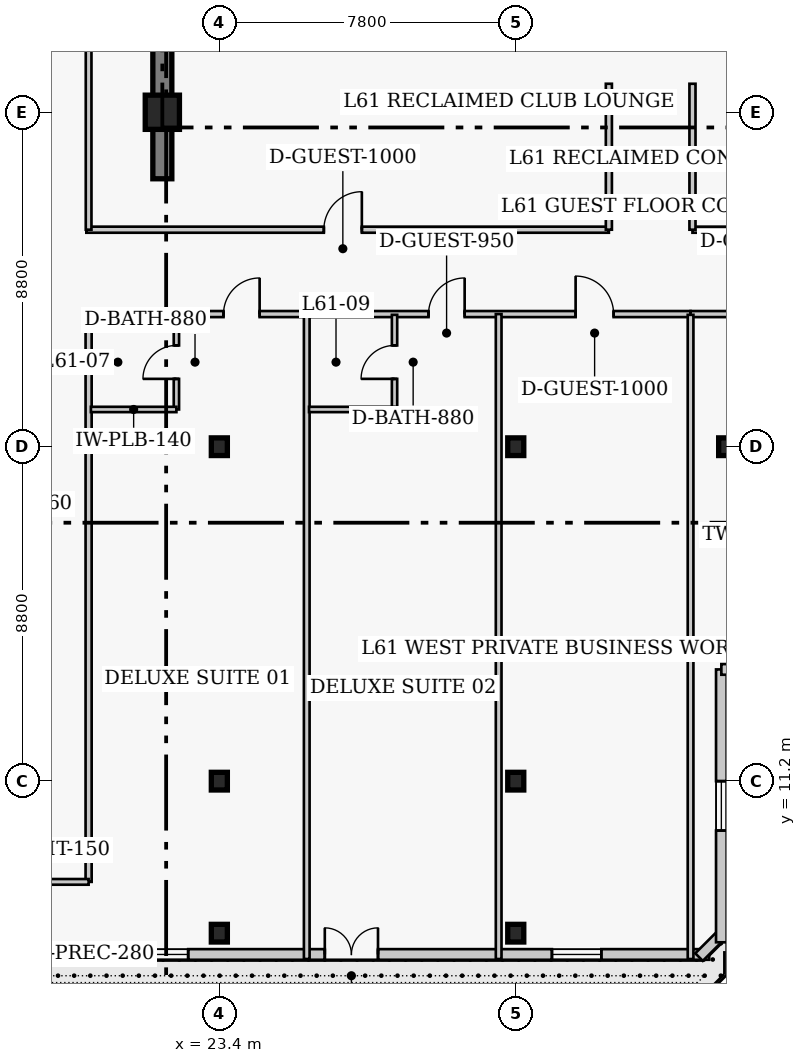
"""IFC4 building model, lengths in metres.
Left out: names, types, materials, properties, quantities, classifications, styles, units other than length and angle.
Written with IfcOpenShell. Run it as: python <this file> out.ifc"""

import sys

from ifc_helpers import new_model, si_unit, direction, frame, frame_2d, origin, origin_2d, place, context, subcontext, project, spatial, rectangle, i_section, extrude, element, fill, save


model = new_model("IFC4")
c1 = context("Model", 3, precision=1e-05, world=origin(), true_north=direction((0.0, 1.0)))
c2 = subcontext(c1, "Body", "Model", "MODEL_VIEW")
j1 = project(units=[si_unit("LENGTHUNIT", "METRE"), si_unit("PLANEANGLEUNIT", "RADIAN")], contexts=[c1])
p1 = place(None, origin())
s1 = spatial("IfcSite", under=j1, at=p1, CompositionType="ELEMENT")
p2 = place(p1, origin())
s2 = spatial("IfcBuilding", under=s1, at=p2, CompositionType="ELEMENT")
p3 = place(p2, frame((0.0, 0.0, 245.4)))
s3 = spatial("IfcBuildingStorey", under=s2, at=p3, CompositionType="ELEMENT", Elevation=245.4)
p4 = place(p3, frame((21.9, 27.05, 0.0), z_axis=(0.0, 0.0, 1.0), x_axis=(0.0, 1.0, 0.0)))
e1 = element("IfcWall", 1, at=p4, inside=s3, PredefinedType="SHEAR", context=c2, shape_type="SweptSolid", body=[
    extrude(rectangle(XDim=13.52, YDim=0.5, at=frame_2d((6.76, 0.0))), origin(), (0.0, 0.0, 1.0), 4.0),
])
for number, where, z_axis, x_axis in (
    (2, (23.4, 11.2, 0.0), (0.0, 0.0, 1.0), (1.0, 0.0, 0.0)),
    (3, (23.4, 20.0, 0.0), (0.0, 0.0, 1.0), (1.0, 0.0, 0.0)),
    (4, (31.2, 11.2, 0.0), (0.0, 0.0, 1.0), (1.0, 0.0, 0.0)),
    (5, (31.2, 20.0, 0.0), (0.0, 0.0, 1.0), (1.0, 0.0, 0.0)),
    (6, (36.75, 20.0, 0.0), (0.0, 0.0, 1.0), (1.0, 0.0, 0.0)),
):
    element("IfcColumn", number, at=place(p3, frame(where, z_axis=z_axis, x_axis=x_axis)), inside=s3, PredefinedType="COLUMN", context=c2, shape_type="SweptSolid", body=[
        extrude(i_section(OverallWidth=0.422, OverallDepth=0.465, WebThickness=0.045, FlangeThickness=0.073, FilletRadius=0.017, at=origin_2d()), origin(), (0.0, 0.0, 1.0), 4.0),
    ])
p5 = place(p3, frame((21.9, 28.8, 0.0), z_axis=(0.0, 0.0, 1.0), x_axis=(1.0, 0.0, 0.0)))
e7 = element("IfcColumn", 7, at=p5, inside=s3, PredefinedType="COLUMN", context=c2, shape_type="SweptSolid", body=[
    extrude(rectangle(XDim=0.9, YDim=0.9, at=origin_2d()), origin(), (0.0, 0.0, 1.0), 4.0),
])
for number, where, z_axis, x_axis in (
    (8, (23.4, 7.2, 0.0), (0.0, 0.0, 1.0), (1.0, 0.0, 0.0)),
    (9, (31.2, 7.2, 0.0), (0.0, 0.0, 1.0), (1.0, 0.0, 0.0)),
):
    element("IfcColumn", number, at=place(p3, frame(where, z_axis=z_axis, x_axis=x_axis)), inside=s3, PredefinedType="COLUMN", context=c2, shape_type="SweptSolid", body=[
        extrude(i_section(OverallWidth=0.422, OverallDepth=0.465, WebThickness=0.045, FlangeThickness=0.073, FilletRadius=0.017, at=origin_2d()), origin(), (0.0, 0.0, 1.0), 4.0),
    ])
p6 = place(p3, frame((11.46, 6.64, 0.0), z_axis=(0.0, 0.0, 1.0), x_axis=(1.0, 0.0, 0.0)))
e10 = element("IfcWall", 10, at=p6, inside=s3, PredefinedType="SOLIDWALL", context=c2, shape_type="SweptSolid", body=[
    extrude(rectangle(XDim=24.83, YDim=0.28, at=frame_2d((12.415, 0.0))), origin(), (0.0, 0.0, 1.0), 3.76),
])
p7 = place(p6, frame((14.715, 0.0, 0.0)))
e11 = element("IfcOpeningElement", 11, at=p7, cuts=e10, PredefinedType="OPENING", context=c2, shape_type="SweptSolid", body=[
    extrude(rectangle(XDim=1.4, YDim=2.15, at=frame_2d((0.7, 1.075))), frame((0.0, 0.15, 0.0), z_axis=(0.0, -1.0, 0.0), x_axis=(1.0, 0.0, 0.0)), (0.0, 0.0, 1.0), 0.3),
])
p8 = place(p6, frame((3.488, 0.0, 0.85)))
e12 = element("IfcOpeningElement", 12, at=p8, cuts=e10, PredefinedType="OPENING", context=c2, shape_type="SweptSolid", body=[
    extrude(rectangle(XDim=1.3, YDim=1.7, at=frame_2d((0.65, 0.85))), frame((0.0, 0.15, 0.0), z_axis=(0.0, -1.0, 0.0), x_axis=(1.0, 0.0, 0.0)), (0.0, 0.0, 1.0), 0.3),
])
p9 = place(p6, frame((20.692, 0.0, 0.85)))
e13 = element("IfcOpeningElement", 13, at=p9, cuts=e10, PredefinedType="OPENING", context=c2, shape_type="SweptSolid", body=[
    extrude(rectangle(XDim=1.3, YDim=1.7, at=frame_2d((0.65, 0.85))), frame((0.0, 0.15, 0.0), z_axis=(0.0, -1.0, 0.0), x_axis=(1.0, 0.0, 0.0)), (0.0, 0.0, 1.0), 0.3),
])
p10 = place(p6, frame((9.82, 0.0, 0.85)))
e14 = element("IfcOpeningElement", 14, at=p10, cuts=e10, PredefinedType="OPENING", context=c2, shape_type="SweptSolid", body=[
    extrude(rectangle(XDim=1.3, YDim=1.7, at=frame_2d((0.65, 0.85))), frame((0.0, 0.15, 0.0), z_axis=(0.0, -1.0, 0.0), x_axis=(1.0, 0.0, 0.0)), (0.0, 0.0, 1.0), 0.3),
])
p11 = place(p3, frame((36.023, 6.571, 0.0), z_axis=(0.0, 0.0, 1.0), x_axis=(0.707106781187, 0.707106781187, 0.0)))
e15 = element("IfcWall", 15, at=p11, inside=s3, PredefinedType="SOLIDWALL", context=c2, shape_type="SweptSolid", body=[
    extrude(rectangle(XDim=0.928, YDim=0.28, at=frame_2d((0.464, 0.0))), origin(), (0.0, 0.0, 1.0), 3.76),
])
p12 = place(p3, frame((36.61, 6.96, 0.0), z_axis=(0.0, 0.0, 1.0), x_axis=(0.0, 1.0, 0.0)))
e16 = element("IfcWall", 16, at=p12, inside=s3, PredefinedType="SOLIDWALL", context=c2, shape_type="SweptSolid", body=[
    extrude(rectangle(XDim=7.18, YDim=0.28, at=frame_2d((3.59, 0.0))), origin(), (0.0, 0.0, 1.0), 3.76),
])
p13 = place(p12, frame((2.94, 0.0, 0.85)))
e17 = element("IfcOpeningElement", 17, at=p13, cuts=e16, PredefinedType="OPENING", context=c2, shape_type="SweptSolid", body=[
    extrude(rectangle(XDim=1.3, YDim=1.7, at=frame_2d((0.65, 0.85))), frame((0.0, 0.15, 0.0), z_axis=(0.0, -1.0, 0.0), x_axis=(1.0, 0.0, 0.0)), (0.0, 0.0, 1.0), 0.3),
])
p14 = place(p3, frame((36.61, 14.14, 0.0), z_axis=(0.0, 0.0, 1.0), x_axis=(1.0, 0.0, 0.0)))
e18 = element("IfcWall", 18, at=p14, inside=s3, PredefinedType="SOLIDWALL", context=c2, shape_type="SweptSolid", body=[
    extrude(rectangle(XDim=4.78, YDim=0.28, at=frame_2d((2.39, 0.0))), origin(), (0.0, 0.0, 1.0), 3.76),
])
p15 = place(p14, frame((1.74, 0.0, 0.85)))
e19 = element("IfcOpeningElement", 19, at=p15, cuts=e18, PredefinedType="OPENING", context=c2, shape_type="SweptSolid", body=[
    extrude(rectangle(XDim=1.3, YDim=1.7, at=frame_2d((0.65, 0.85))), frame((0.0, 0.15, 0.0), z_axis=(0.0, -1.0, 0.0), x_axis=(1.0, 0.0, 0.0)), (0.0, 0.0, 1.0), 0.3),
])
p16 = place(p3, frame((19.9, 25.71, 0.0), z_axis=(0.0, 0.0, 1.0), x_axis=(1.0, 0.0, 0.0)))
e20 = element("IfcWall", 20, at=p16, inside=s3, PredefinedType="PARTITIONING", context=c2, shape_type="SweptSolid", body=[
    extrude(rectangle(XDim=13.75, YDim=0.16, at=frame_2d((6.875, 0.0))), origin(), (0.0, 0.0, 1.0), 3.76),
])
p17 = place(p16, frame((6.25, 0.0, 0.0)))
e21 = element("IfcOpeningElement", 21, at=p17, cuts=e20, PredefinedType="OPENING", context=c2, shape_type="SweptSolid", body=[
    extrude(rectangle(XDim=1.0, YDim=2.15, at=frame_2d((0.5, 1.075))), frame((0.0, 0.09, 0.0), z_axis=(0.0, -1.0, 0.0), x_axis=(1.0, 0.0, 0.0)), (0.0, 0.0, 1.0), 0.18),
])
p18 = place(p3, frame((35.85, 25.71, 0.0), z_axis=(0.0, 0.0, 1.0), x_axis=(1.0, 0.0, 0.0)))
e22 = element("IfcWall", 22, at=p18, inside=s3, PredefinedType="PARTITIONING", context=c2, shape_type="SweptSolid", body=[
    extrude(rectangle(XDim=23.45, YDim=0.16, at=frame_2d((11.725, 0.0))), origin(), (0.0, 0.0, 1.0), 3.76),
])
p19 = place(p18, frame((6.15, 0.0, 0.0)))
e23 = element("IfcOpeningElement", 23, at=p19, cuts=e22, PredefinedType="OPENING", context=c2, shape_type="SweptSolid", body=[
    extrude(rectangle(XDim=1.0, YDim=2.15, at=frame_2d((0.5, 1.075))), frame((0.0, 0.09, 0.0), z_axis=(0.0, -1.0, 0.0), x_axis=(1.0, 0.0, 0.0)), (0.0, 0.0, 1.0), 0.18),
])
p20 = place(p18, frame((13.65, 0.0, 0.0)))
e24 = element("IfcOpeningElement", 24, at=p20, cuts=e22, PredefinedType="OPENING", context=c2, shape_type="SweptSolid", body=[
    extrude(rectangle(XDim=1.0, YDim=2.15, at=frame_2d((0.5, 1.075))), frame((0.0, 0.09, 0.0), z_axis=(0.0, -1.0, 0.0), x_axis=(1.0, 0.0, 0.0)), (0.0, 0.0, 1.0), 0.18),
])
for number, where, z_axis, x_axis in (
    (25, (33.65, 25.71, 0.0), (0.0, 0.0, 1.0), (0.0, 1.0, 0.0)),
    (26, (35.85, 25.71, 0.0), (0.0, 0.0, 1.0), (0.0, 1.0, 0.0)),
):
    element("IfcWall", number, at=place(p3, frame(where, z_axis=z_axis, x_axis=x_axis)), inside=s3, PredefinedType="PARTITIONING", context=c2, shape_type="SweptSolid", body=[
        extrude(rectangle(XDim=3.84, YDim=0.16, at=frame_2d((1.92, 0.0))), origin(), (0.0, 0.0, 1.0), 3.76),
    ])
p21 = place(p3, frame((19.9, 23.49, 0.0), z_axis=(0.0, 0.0, 1.0), x_axis=(1.0, 0.0, 0.0)))
e27 = element("IfcWall", 27, at=p21, inside=s3, PredefinedType="PARTITIONING", context=c2, shape_type="SweptSolid", body=[
    extrude(rectangle(XDim=15.9, YDim=0.16, at=frame_2d((7.95, 0.0))), origin(), (0.0, 0.0, 1.0), 3.76),
])
p22 = place(p21, frame((3.61, 0.0, 0.0)))
e28 = element("IfcOpeningElement", 28, at=p22, cuts=e27, PredefinedType="OPENING", context=c2, shape_type="SweptSolid", body=[
    extrude(rectangle(XDim=0.95, YDim=2.1, at=frame_2d((0.475, 1.05))), frame((0.0, 0.09, 0.0), z_axis=(0.0, -1.0, 0.0), x_axis=(1.0, 0.0, 0.0)), (0.0, 0.0, 1.0), 0.18),
])
p23 = place(p21, frame((9.005, 0.0, 0.0)))
e29 = element("IfcOpeningElement", 29, at=p23, cuts=e27, PredefinedType="OPENING", context=c2, shape_type="SweptSolid", body=[
    extrude(rectangle(XDim=0.95, YDim=2.1, at=frame_2d((0.475, 1.05))), frame((0.0, 0.09, 0.0), z_axis=(0.0, -1.0, 0.0), x_axis=(1.0, 0.0, 0.0)), (0.0, 0.0, 1.0), 0.18),
])
p24 = place(p21, frame((12.875, 0.0, 0.0)))
e30 = element("IfcOpeningElement", 30, at=p24, cuts=e27, PredefinedType="OPENING", context=c2, shape_type="SweptSolid", body=[
    extrude(rectangle(XDim=1.0, YDim=2.15, at=frame_2d((0.5, 1.075))), frame((0.0, 0.09, 0.0), z_axis=(0.0, -1.0, 0.0), x_axis=(1.0, 0.0, 0.0)), (0.0, 0.0, 1.0), 0.18),
])
p25 = place(p3, frame((35.8, 23.49, 0.0), z_axis=(0.0, 0.0, 1.0), x_axis=(1.0, 0.0, 0.0)))
e31 = element("IfcWall", 31, at=p25, inside=s3, PredefinedType="PARTITIONING", context=c2, shape_type="SweptSolid", body=[
    extrude(rectangle(XDim=25.66, YDim=0.16, at=frame_2d((12.83, 0.0))), origin(), (0.0, 0.0, 1.0), 3.76),
])
p26 = place(p25, frame((1.555, 0.0, 0.0)))
e32 = element("IfcOpeningElement", 32, at=p26, cuts=e31, PredefinedType="OPENING", context=c2, shape_type="SweptSolid", body=[
    extrude(rectangle(XDim=0.95, YDim=2.1, at=frame_2d((0.475, 1.05))), frame((0.0, 0.09, 0.0), z_axis=(0.0, -1.0, 0.0), x_axis=(1.0, 0.0, 0.0)), (0.0, 0.0, 1.0), 0.18),
])
p27 = place(p25, frame((10.57, 0.0, 0.0)))
e33 = element("IfcOpeningElement", 33, at=p27, cuts=e31, PredefinedType="OPENING", context=c2, shape_type="SweptSolid", body=[
    extrude(rectangle(XDim=0.95, YDim=2.1, at=frame_2d((0.475, 1.05))), frame((0.0, 0.09, 0.0), z_axis=(0.0, -1.0, 0.0), x_axis=(1.0, 0.0, 0.0)), (0.0, 0.0, 1.0), 0.18),
])
p28 = place(p25, frame((15.105, 0.0, 0.0)))
e34 = element("IfcOpeningElement", 34, at=p28, cuts=e31, PredefinedType="OPENING", context=c2, shape_type="SweptSolid", body=[
    extrude(rectangle(XDim=1.0, YDim=2.15, at=frame_2d((0.5, 1.075))), frame((0.0, 0.09, 0.0), z_axis=(0.0, -1.0, 0.0), x_axis=(1.0, 0.0, 0.0)), (0.0, 0.0, 1.0), 0.18),
])
p29 = place(p25, frame((19.285, 0.0, 0.0)))
e35 = element("IfcOpeningElement", 35, at=p29, cuts=e31, PredefinedType="OPENING", context=c2, shape_type="SweptSolid", body=[
    extrude(rectangle(XDim=0.95, YDim=2.1, at=frame_2d((0.475, 1.05))), frame((0.0, 0.09, 0.0), z_axis=(0.0, -1.0, 0.0), x_axis=(1.0, 0.0, 0.0)), (0.0, 0.0, 1.0), 0.18),
])
p30 = place(p25, frame((24.115, 0.0, 0.0)))
e36 = element("IfcOpeningElement", 36, at=p30, cuts=e31, PredefinedType="OPENING", context=c2, shape_type="SweptSolid", body=[
    extrude(rectangle(XDim=0.95, YDim=2.1, at=frame_2d((0.475, 1.05))), frame((0.0, 0.09, 0.0), z_axis=(0.0, -1.0, 0.0), x_axis=(1.0, 0.0, 0.0)), (0.0, 0.0, 1.0), 0.18),
])
p31 = place(p3, frame((19.96, 8.55, 0.0), z_axis=(0.0, 0.0, 1.0), x_axis=(0.0, 1.0, 0.0)))
e37 = element("IfcWall", 37, at=p31, inside=s3, PredefinedType="PARTITIONING", context=c2, shape_type="SweptSolid", body=[
    extrude(rectangle(XDim=14.94, YDim=0.16, at=frame_2d((7.47, 0.0))), origin(), (0.0, 0.0, 1.0), 3.76),
])
p32 = place(p3, frame((17.74, 8.55, 0.0), z_axis=(0.0, 0.0, 1.0), x_axis=(1.0, 0.0, 0.0)))
e38 = element("IfcWall", 38, at=p32, inside=s3, PredefinedType="PARTITIONING", context=c2, shape_type="SweptSolid", body=[
    extrude(rectangle(XDim=2.22, YDim=0.15, at=frame_2d((1.11, 0.0))), origin(), (0.0, 0.0, 1.0), 3.76),
])
p33 = place(p3, frame((19.96, 25.71, 0.0), z_axis=(0.0, 0.0, 1.0), x_axis=(0.0, 1.0, 0.0)))
e39 = element("IfcWall", 39, at=p33, inside=s3, PredefinedType="PARTITIONING", context=c2, shape_type="SweptSolid", body=[
    extrude(rectangle(XDim=7.09, YDim=0.15, at=frame_2d((3.545, 0.0))), origin(), (0.0, 0.0, 1.0), 3.76),
])
p34 = place(p3, frame((22.27, 20.98, 0.0), z_axis=(0.0, 0.0, 1.0), x_axis=(0.0, 1.0, 0.0)))
e40 = element("IfcWall", 40, at=p34, inside=s3, PredefinedType="PLUMBINGWALL", context=c2, shape_type="SweptSolid", body=[
    extrude(rectangle(XDim=2.49, YDim=0.14, at=frame_2d((1.245, 0.0))), origin(), (0.0, 0.0, 1.0), 3.76),
])
p35 = place(p34, frame((0.805, 0.0, 0.0)))
e41 = element("IfcOpeningElement", 41, at=p35, cuts=e40, PredefinedType="OPENING", context=c2, shape_type="SweptSolid", body=[
    extrude(rectangle(XDim=0.88, YDim=2.05, at=frame_2d((0.44, 1.025))), frame((0.0, 0.08, 0.0), z_axis=(0.0, -1.0, 0.0), x_axis=(1.0, 0.0, 0.0)), (0.0, 0.0, 1.0), 0.16),
])
p36 = place(p3, frame((20.02, 20.98, 0.0), z_axis=(0.0, 0.0, 1.0), x_axis=(1.0, 0.0, 0.0)))
e42 = element("IfcWall", 42, at=p36, inside=s3, PredefinedType="PLUMBINGWALL", context=c2, shape_type="SweptSolid", body=[
    extrude(rectangle(XDim=2.25, YDim=0.14, at=frame_2d((1.125, 0.0))), origin(), (0.0, 0.0, 1.0), 3.76),
])
p37 = place(p3, frame((25.7, 6.52, 0.0), z_axis=(0.0, 0.0, 1.0), x_axis=(0.0, 1.0, 0.0)))
e43 = element("IfcWall", 43, at=p37, inside=s3, PredefinedType="PARTITIONING", context=c2, shape_type="SweptSolid", body=[
    extrude(rectangle(XDim=16.97, YDim=0.15, at=frame_2d((8.485, 0.0))), origin(), (0.0, 0.0, 1.0), 3.76),
])
p38 = place(p3, frame((28.01, 20.98, 0.0), z_axis=(0.0, 0.0, 1.0), x_axis=(0.0, 1.0, 0.0)))
e44 = element("IfcWall", 44, at=p38, inside=s3, PredefinedType="PLUMBINGWALL", context=c2, shape_type="SweptSolid", body=[
    extrude(rectangle(XDim=2.49, YDim=0.14, at=frame_2d((1.245, 0.0))), origin(), (0.0, 0.0, 1.0), 3.76),
])
p39 = place(p38, frame((0.805, 0.0, 0.0)))
e45 = element("IfcOpeningElement", 45, at=p39, cuts=e44, PredefinedType="OPENING", context=c2, shape_type="SweptSolid", body=[
    extrude(rectangle(XDim=0.88, YDim=2.05, at=frame_2d((0.44, 1.025))), frame((0.0, 0.08, 0.0), z_axis=(0.0, -1.0, 0.0), x_axis=(1.0, 0.0, 0.0)), (0.0, 0.0, 1.0), 0.16),
])
p40 = place(p3, frame((25.76, 20.98, 0.0), z_axis=(0.0, 0.0, 1.0), x_axis=(1.0, 0.0, 0.0)))
e46 = element("IfcWall", 46, at=p40, inside=s3, PredefinedType="PLUMBINGWALL", context=c2, shape_type="SweptSolid", body=[
    extrude(rectangle(XDim=2.25, YDim=0.14, at=frame_2d((1.125, 0.0))), origin(), (0.0, 0.0, 1.0), 3.76),
])
p41 = place(p3, frame((30.75, 6.52, 0.0), z_axis=(0.0, 0.0, 1.0), x_axis=(0.0, 1.0, 0.0)))
e47 = element("IfcWall", 47, at=p41, inside=s3, PredefinedType="PARTITIONING", context=c2, shape_type="SweptSolid", body=[
    extrude(rectangle(XDim=16.97, YDim=0.15, at=frame_2d((8.485, 0.0))), origin(), (0.0, 0.0, 1.0), 3.76),
])
p42 = place(p3, frame((35.8, 6.52, 0.0), z_axis=(0.0, 0.0, 1.0), x_axis=(0.0, 1.0, 0.0)))
e48 = element("IfcWall", 48, at=p42, inside=s3, PredefinedType="PARTITIONING", context=c2, shape_type="SweptSolid", body=[
    extrude(rectangle(XDim=16.95, YDim=0.15, at=frame_2d((8.475, 0.0))), origin(), (0.0, 0.0, 1.0), 3.76),
])
p43 = place(p7, origin())
e49 = element("IfcDoor", 49, at=p43, inside=s3, OperationType="DOUBLE_DOOR_SINGLE_SWING", PredefinedType="DOOR", context=c2, shape_type="SweptSolid", body=[
    extrude(rectangle(XDim=1.4, YDim=2.15, at=frame_2d((0.7, 1.075))), frame((0.0, 0.025, 0.0), z_axis=(0.0, -1.0, 0.0), x_axis=(1.0, 0.0, 0.0)), (0.0, 0.0, 1.0), 0.05),
])
fill(e11, e49)
p44 = place(p9, origin())
e50 = element("IfcWindow", 50, at=p44, inside=s3, PartitioningType="SINGLE_PANEL", PredefinedType="WINDOW", context=c2, shape_type="SweptSolid", body=[
    extrude(rectangle(XDim=1.3, YDim=1.7, at=frame_2d((0.65, 0.85))), frame((0.0, 0.03, 0.0), z_axis=(0.0, -1.0, 0.0), x_axis=(1.0, 0.0, 0.0)), (0.0, 0.0, 1.0), 0.06),
])
fill(e13, e50)
p45 = place(p13, origin())
e51 = element("IfcWindow", 51, at=p45, inside=s3, PartitioningType="SINGLE_PANEL", PredefinedType="WINDOW", context=c2, shape_type="SweptSolid", body=[
    extrude(rectangle(XDim=1.3, YDim=1.7, at=frame_2d((0.65, 0.85))), frame((0.0, 0.03, 0.0), z_axis=(0.0, -1.0, 0.0), x_axis=(1.0, 0.0, 0.0)), (0.0, 0.0, 1.0), 0.06),
])
fill(e17, e51)
p46 = place(p10, origin())
e52 = element("IfcWindow", 52, at=p46, inside=s3, PartitioningType="SINGLE_PANEL", PredefinedType="WINDOW", context=c2, shape_type="SweptSolid", body=[
    extrude(rectangle(XDim=1.3, YDim=1.7, at=frame_2d((0.65, 0.85))), frame((0.0, 0.03, 0.0), z_axis=(0.0, -1.0, 0.0), x_axis=(1.0, 0.0, 0.0)), (0.0, 0.0, 1.0), 0.06),
])
fill(e14, e52)
p47 = place(p17, origin())
e53 = element("IfcDoor", 53, at=p47, inside=s3, OperationType="SINGLE_SWING_RIGHT", PredefinedType="DOOR", context=c2, shape_type="SweptSolid", body=[
    extrude(rectangle(XDim=1.0, YDim=2.15, at=frame_2d((0.5, 1.075))), frame((0.0, 0.025, 0.0), z_axis=(0.0, -1.0, 0.0), x_axis=(1.0, 0.0, 0.0)), (0.0, 0.0, 1.0), 0.05),
])
fill(e21, e53)
p48 = place(p35, origin())
e54 = element("IfcDoor", 54, at=p48, inside=s3, OperationType="SINGLE_SWING_LEFT", PredefinedType="DOOR", context=c2, shape_type="SweptSolid", body=[
    extrude(rectangle(XDim=0.88, YDim=2.05, at=frame_2d((0.44, 1.025))), frame((0.0, 0.025, 0.0), z_axis=(0.0, -1.0, 0.0), x_axis=(1.0, 0.0, 0.0)), (0.0, 0.0, 1.0), 0.05),
])
fill(e41, e54)
p49 = place(p22, origin())
e55 = element("IfcDoor", 55, at=p49, inside=s3, OperationType="SINGLE_SWING_RIGHT", PredefinedType="DOOR", context=c2, shape_type="SweptSolid", body=[
    extrude(rectangle(XDim=0.95, YDim=2.1, at=frame_2d((0.475, 1.05))), frame((0.0, 0.025, 0.0), z_axis=(0.0, -1.0, 0.0), x_axis=(1.0, 0.0, 0.0)), (0.0, 0.0, 1.0), 0.05),
])
fill(e28, e55)
p50 = place(p39, origin())
e56 = element("IfcDoor", 56, at=p50, inside=s3, OperationType="SINGLE_SWING_LEFT", PredefinedType="DOOR", context=c2, shape_type="SweptSolid", body=[
    extrude(rectangle(XDim=0.88, YDim=2.05, at=frame_2d((0.44, 1.025))), frame((0.0, 0.025, 0.0), z_axis=(0.0, -1.0, 0.0), x_axis=(1.0, 0.0, 0.0)), (0.0, 0.0, 1.0), 0.05),
])
fill(e45, e56)
p51 = place(p23, origin())
e57 = element("IfcDoor", 57, at=p51, inside=s3, OperationType="SINGLE_SWING_RIGHT", PredefinedType="DOOR", context=c2, shape_type="SweptSolid", body=[
    extrude(rectangle(XDim=0.95, YDim=2.1, at=frame_2d((0.475, 1.05))), frame((0.0, 0.025, 0.0), z_axis=(0.0, -1.0, 0.0), x_axis=(1.0, 0.0, 0.0)), (0.0, 0.0, 1.0), 0.05),
])
fill(e29, e57)
p52 = place(p24, origin())
e58 = element("IfcDoor", 58, at=p52, inside=s3, OperationType="SINGLE_SWING_LEFT", PredefinedType="DOOR", context=c2, shape_type="SweptSolid", body=[
    extrude(rectangle(XDim=1.0, YDim=2.15, at=frame_2d((0.5, 1.075))), frame((0.0, 0.025, 0.0), z_axis=(0.0, -1.0, 0.0), x_axis=(1.0, 0.0, 0.0)), (0.0, 0.0, 1.0), 0.05),
])
fill(e30, e58)
save(model, sys.argv[1])
